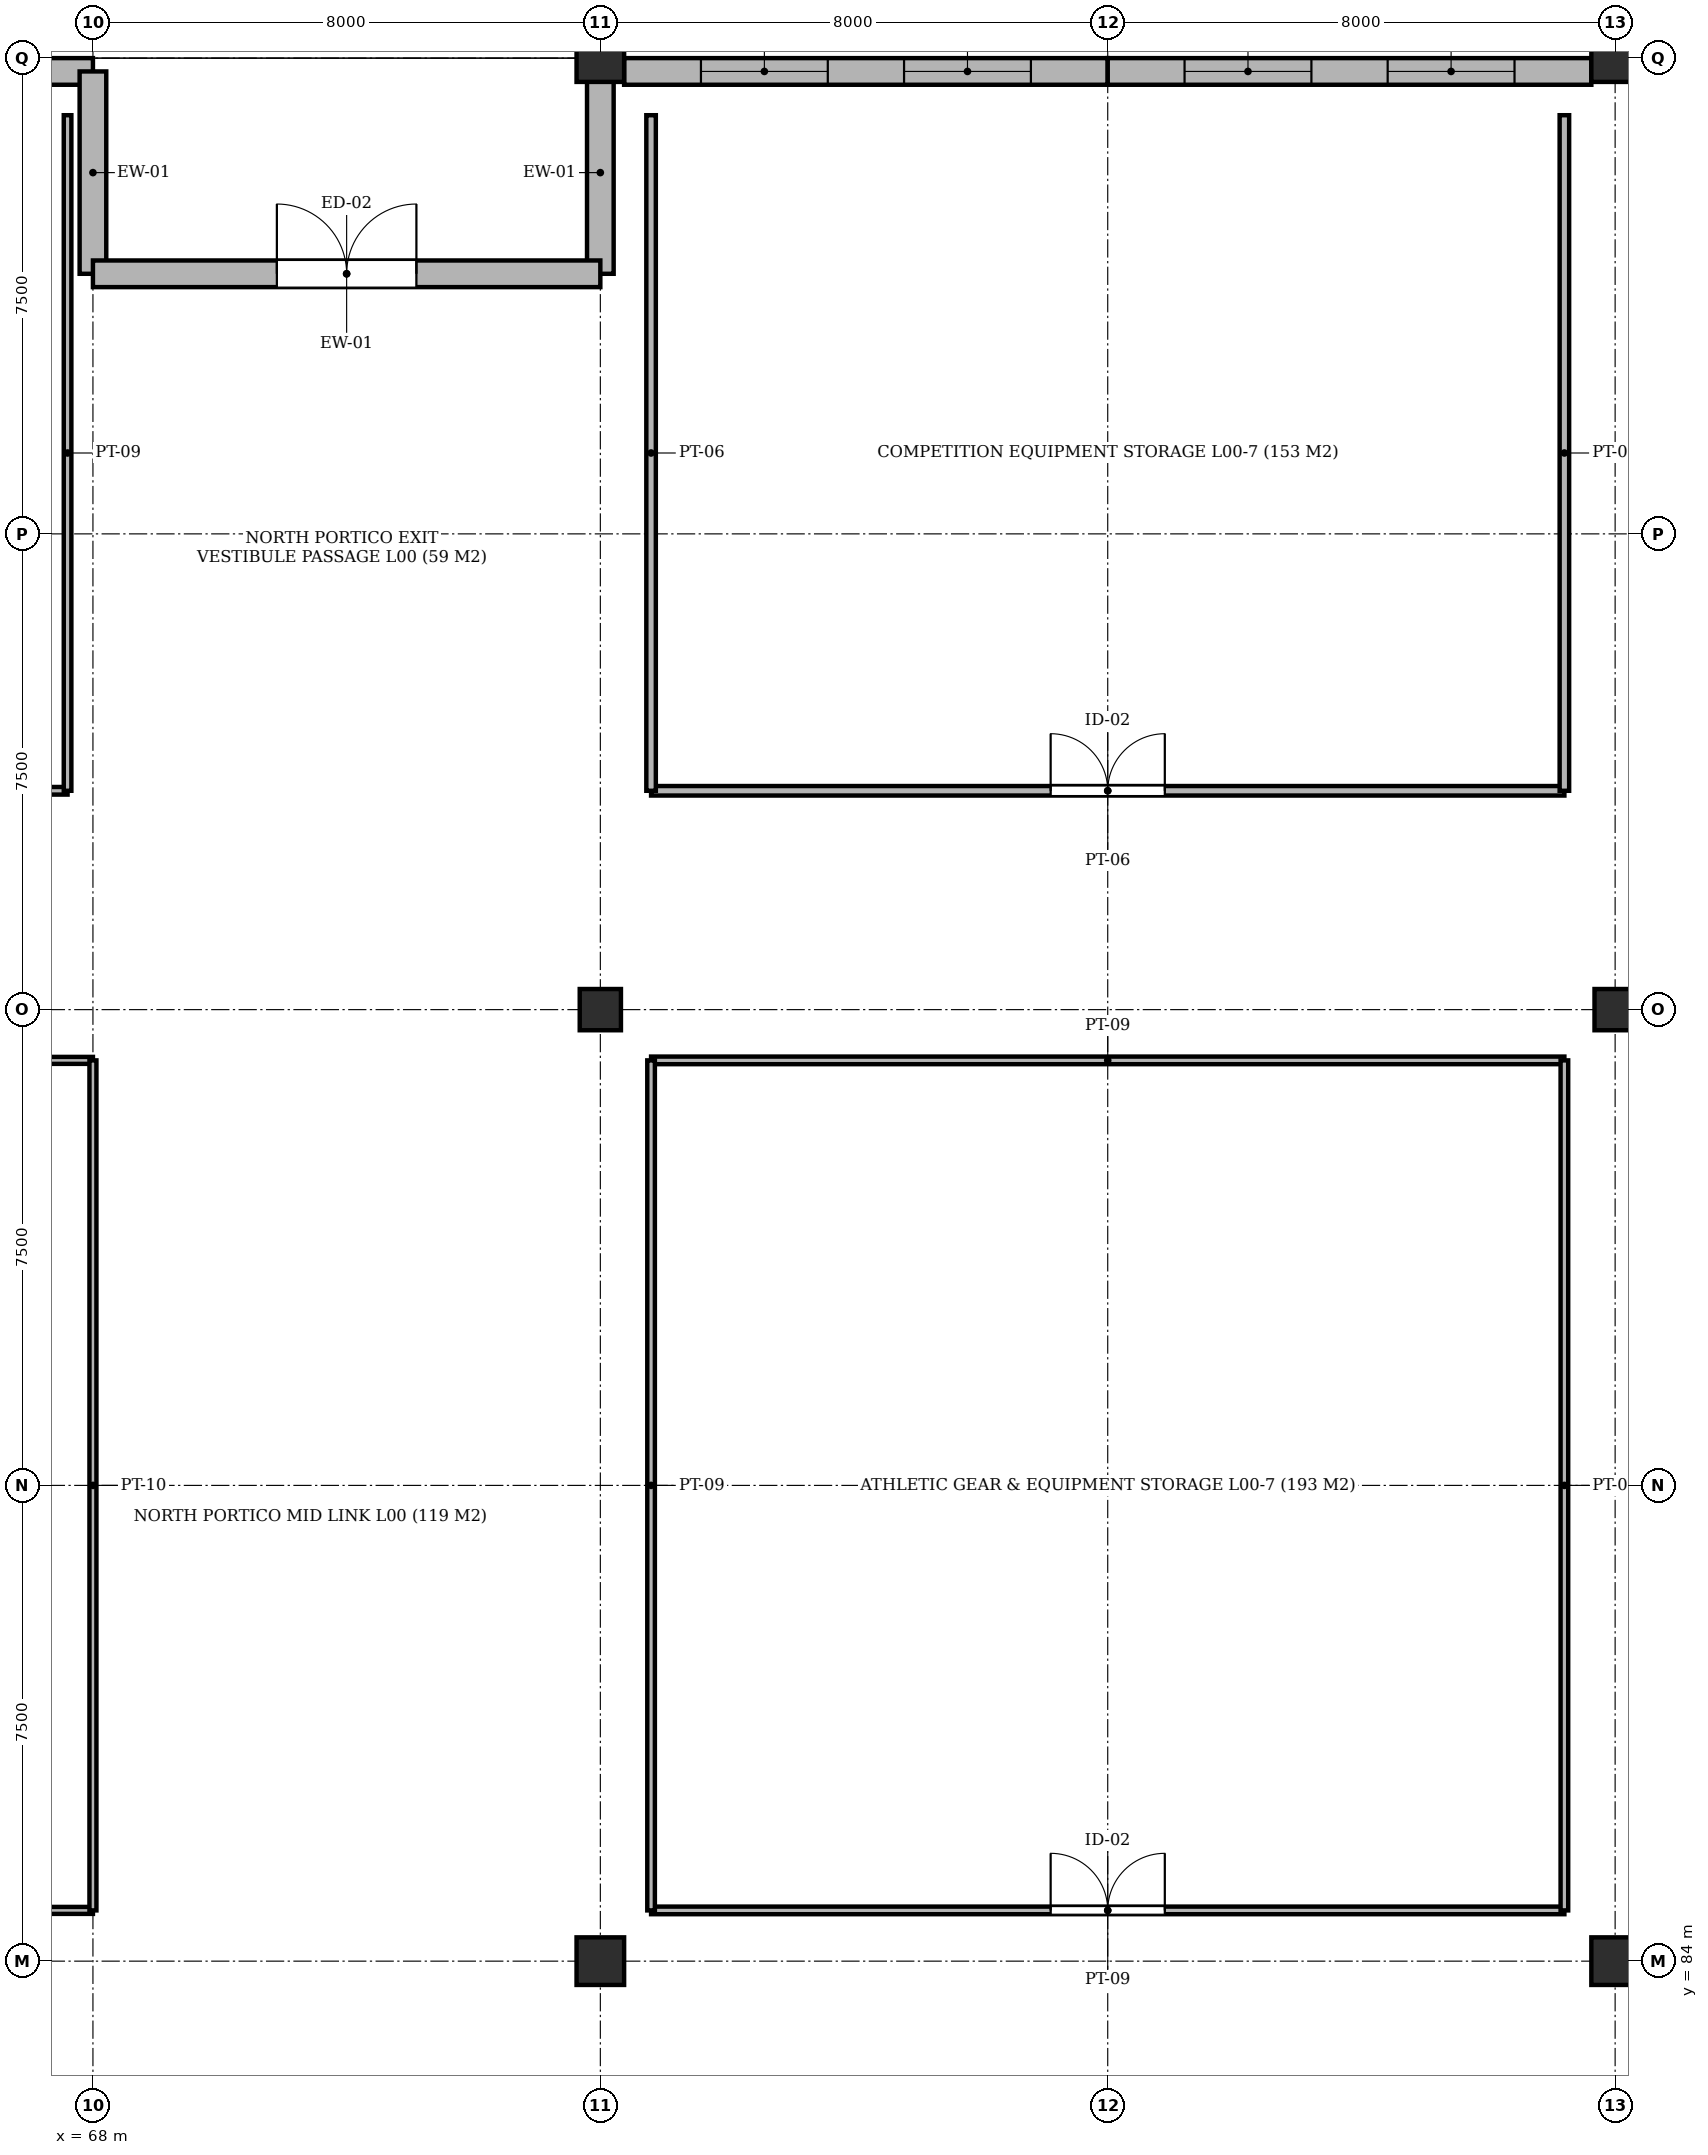
"""IFC4 building model, lengths in metres.
Left out: names, types, materials, properties, quantities, classifications, styles, units other than length and angle.
Written with IfcOpenShell. Run it as: python <this file> out.ifc"""

import sys

from ifc_helpers import new_model, si_unit, direction, frame, frame_2d, origin, origin_2d, place, context, subcontext, project, spatial, rectangle, extrude, element, fill, save


model = new_model("IFC4")
c1 = context("Model", 3, precision=1e-05, world=origin(), true_north=direction((0.0, 1.0)))
c2 = subcontext(c1, "Body", "Model", "MODEL_VIEW")
j1 = project(units=[si_unit("LENGTHUNIT", "METRE"), si_unit("PLANEANGLEUNIT", "RADIAN")], contexts=[c1])
p1 = place(None, origin())
s1 = spatial("IfcSite", under=j1, at=p1, CompositionType="ELEMENT")
p2 = place(p1, origin())
s2 = spatial("IfcBuilding", under=s1, at=p2, CompositionType="ELEMENT")
p3 = place(p2, origin())
s3 = spatial("IfcBuildingStorey", under=s2, at=p3, CompositionType="ELEMENT", Elevation=0.0)
p4 = place(p3, frame((76.0, 84.0, -0.35), z_axis=(0.0, 0.0, 1.0), x_axis=(1.0, 0.0, 0.0)))
e1 = element("IfcColumn", 1, at=p4, inside=s3, PredefinedType="COLUMN", context=c2, shape_type="SweptSolid", body=[
    extrude(rectangle(XDim=0.75, YDim=0.75, at=origin_2d()), origin(), (0.0, 0.0, 1.0), 4.65),
])
p5 = place(p3, frame((76.0, 99.0, -0.35), z_axis=(0.0, 0.0, 1.0), x_axis=(1.0, 0.0, 0.0)))
e2 = element("IfcColumn", 2, at=p5, inside=s3, PredefinedType="COLUMN", context=c2, shape_type="SweptSolid", body=[
    extrude(rectangle(XDim=0.65, YDim=0.65, at=origin_2d()), origin(), (0.0, 0.0, 1.0), 4.65),
])
for number, where, z_axis, x_axis in (
    (3, (76.0, 114.0, -0.35), (0.0, 0.0, 1.0), (1.0, 0.0, 0.0)),
    (4, (92.0, 84.0, -0.35), (0.0, 0.0, 1.0), (1.0, 0.0, 0.0)),
):
    element("IfcColumn", number, at=place(p3, frame(where, z_axis=z_axis, x_axis=x_axis)), inside=s3, PredefinedType="COLUMN", context=c2, shape_type="SweptSolid", body=[
        extrude(rectangle(XDim=0.75, YDim=0.75, at=origin_2d()), origin(), (0.0, 0.0, 1.0), 4.65),
    ])
p6 = place(p3, frame((92.0, 99.0, -0.35), z_axis=(0.0, 0.0, 1.0), x_axis=(1.0, 0.0, 0.0)))
e5 = element("IfcColumn", 5, at=p6, inside=s3, PredefinedType="COLUMN", context=c2, shape_type="SweptSolid", body=[
    extrude(rectangle(XDim=0.65, YDim=0.65, at=origin_2d()), origin(), (0.0, 0.0, 1.0), 4.65),
])
p7 = place(p3, frame((92.0, 114.0, -0.35), z_axis=(0.0, 0.0, 1.0), x_axis=(1.0, 0.0, 0.0)))
e6 = element("IfcColumn", 6, at=p7, inside=s3, PredefinedType="COLUMN", context=c2, shape_type="SweptSolid", body=[
    extrude(rectangle(XDim=0.75, YDim=0.75, at=origin_2d()), origin(), (0.0, 0.0, 1.0), 4.65),
])
p8 = place(p3, frame((68.0, 113.79, 0.0), z_axis=(0.0, 0.0, 1.0), x_axis=(-1.0, 0.0, 0.0)))
e7 = element("IfcWall", 7, at=p8, inside=s3, PredefinedType="SOLIDWALL", context=c2, shape_type="SweptSolid", body=[
    extrude(rectangle(XDim=7.625, YDim=0.42, at=frame_2d((3.812, 0.0))), origin(), (0.0, 0.0, 1.0), 3.45),
])
p9 = place(p8, frame((4.414, 0.0, 0.92)))
e8 = element("IfcOpeningElement", 8, at=p9, cuts=e7, PredefinedType="OPENING", context=c2, shape_type="SweptSolid", body=[
    extrude(rectangle(XDim=2.0, YDim=1.89, at=frame_2d((1.0, 0.945))), frame((0.0, 0.222, 0.0), z_axis=(0.0, -1.0, 0.0), x_axis=(1.0, 0.0, 0.0)), (0.0, 0.0, 1.0), 0.444),
])
p10 = place(p8, frame((1.211, 0.0, 0.92)))
e9 = element("IfcOpeningElement", 9, at=p10, cuts=e7, PredefinedType="OPENING", context=c2, shape_type="SweptSolid", body=[
    extrude(rectangle(XDim=2.0, YDim=1.89, at=frame_2d((1.0, 0.945))), frame((0.0, 0.222, 0.0), z_axis=(0.0, -1.0, 0.0), x_axis=(1.0, 0.0, 0.0)), (0.0, 0.0, 1.0), 0.444),
])
p11 = place(p3, frame((76.0, 113.79, 0.0), z_axis=(0.0, 0.0, 1.0), x_axis=(0.0, -1.0, 0.0)))
e10 = element("IfcWall", 10, at=p11, inside=s3, PredefinedType="SOLIDWALL", context=c2, shape_type="SweptSolid", body=[
    extrude(rectangle(XDim=3.19, YDim=0.42, at=frame_2d((1.595, 0.0))), origin(), (0.0, 0.0, 1.0), 3.15),
])
p12 = place(p3, frame((68.0, 110.6, 0.0), z_axis=(0.0, 0.0, 1.0), x_axis=(0.0, 1.0, 0.0)))
e11 = element("IfcWall", 11, at=p12, inside=s3, PredefinedType="SOLIDWALL", context=c2, shape_type="SweptSolid", body=[
    extrude(rectangle(XDim=3.19, YDim=0.42, at=frame_2d((1.595, 0.0))), origin(), (0.0, 0.0, 1.0), 3.82),
])
p13 = place(p3, frame((76.0, 110.6, 0.0), z_axis=(0.0, 0.0, 1.0), x_axis=(-1.0, 0.0, 0.0)))
e12 = element("IfcWall", 12, at=p13, inside=s3, PredefinedType="SOLIDWALL", context=c2, shape_type="SweptSolid", body=[
    extrude(rectangle(XDim=8.0, YDim=0.42, at=frame_2d((4.0, 0.0))), origin(), (0.0, 0.0, 1.0), 3.82),
])
p14 = place(p13, frame((2.9, 0.0, 0.0)))
e13 = element("IfcOpeningElement", 13, at=p14, cuts=e12, PredefinedType="OPENING", context=c2, shape_type="SweptSolid", body=[
    extrude(rectangle(XDim=2.2, YDim=2.65, at=frame_2d((1.1, 1.325))), frame((0.0, 0.222, 0.0), z_axis=(0.0, -1.0, 0.0), x_axis=(1.0, 0.0, 0.0)), (0.0, 0.0, 1.0), 0.444),
])
p15 = place(p3, frame((84.0, 113.79, 0.0), z_axis=(0.0, 0.0, 1.0), x_axis=(-1.0, 0.0, 0.0)))
e14 = element("IfcWall", 14, at=p15, inside=s3, PredefinedType="SOLIDWALL", context=c2, shape_type="SweptSolid", body=[
    extrude(rectangle(XDim=7.625, YDim=0.42, at=frame_2d((3.812, 0.0))), origin(), (0.0, 0.0, 1.0), 3.45),
])
p16 = place(p15, frame((4.414, 0.0, 0.92)))
e15 = element("IfcOpeningElement", 15, at=p16, cuts=e14, PredefinedType="OPENING", context=c2, shape_type="SweptSolid", body=[
    extrude(rectangle(XDim=2.0, YDim=1.89, at=frame_2d((1.0, 0.945))), frame((0.0, 0.222, 0.0), z_axis=(0.0, -1.0, 0.0), x_axis=(1.0, 0.0, 0.0)), (0.0, 0.0, 1.0), 0.444),
])
p17 = place(p15, frame((1.211, 0.0, 0.92)))
e16 = element("IfcOpeningElement", 16, at=p17, cuts=e14, PredefinedType="OPENING", context=c2, shape_type="SweptSolid", body=[
    extrude(rectangle(XDim=2.0, YDim=1.89, at=frame_2d((1.0, 0.945))), frame((0.0, 0.222, 0.0), z_axis=(0.0, -1.0, 0.0), x_axis=(1.0, 0.0, 0.0)), (0.0, 0.0, 1.0), 0.444),
])
p18 = place(p3, frame((91.625, 113.79, 0.0), z_axis=(0.0, 0.0, 1.0), x_axis=(-1.0, 0.0, 0.0)))
e17 = element("IfcWall", 17, at=p18, inside=s3, PredefinedType="SOLIDWALL", context=c2, shape_type="SweptSolid", body=[
    extrude(rectangle(XDim=7.625, YDim=0.42, at=frame_2d((3.812, 0.0))), origin(), (0.0, 0.0, 1.0), 3.45),
])
p19 = place(p18, frame((4.414, 0.0, 0.92)))
e18 = element("IfcOpeningElement", 18, at=p19, cuts=e17, PredefinedType="OPENING", context=c2, shape_type="SweptSolid", body=[
    extrude(rectangle(XDim=2.0, YDim=1.89, at=frame_2d((1.0, 0.945))), frame((0.0, 0.222, 0.0), z_axis=(0.0, -1.0, 0.0), x_axis=(1.0, 0.0, 0.0)), (0.0, 0.0, 1.0), 0.444),
])
p20 = place(p18, frame((1.211, 0.0, 0.92)))
e19 = element("IfcOpeningElement", 19, at=p20, cuts=e17, PredefinedType="OPENING", context=c2, shape_type="SweptSolid", body=[
    extrude(rectangle(XDim=2.0, YDim=1.89, at=frame_2d((1.0, 0.945))), frame((0.0, 0.222, 0.0), z_axis=(0.0, -1.0, 0.0), x_axis=(1.0, 0.0, 0.0)), (0.0, 0.0, 1.0), 0.444),
])
p21 = place(p3, frame((60.8, 84.8, 0.0), z_axis=(0.0, 0.0, 1.0), x_axis=(1.0, 0.0, 0.0)))
e20 = element("IfcWall", 20, at=p21, inside=s3, PredefinedType="PARTITIONING", context=c2, shape_type="SweptSolid", body=[
    extrude(rectangle(XDim=7.2, YDim=0.11, at=frame_2d((3.6, 0.0))), origin(), (0.0, 0.0, 1.0), 3.88),
])
p22 = place(p21, frame((3.075, 0.0, 0.0)))
e21 = element("IfcOpeningElement", 21, at=p22, cuts=e20, PredefinedType="OPENING", context=c2, shape_type="SweptSolid", body=[
    extrude(rectangle(XDim=1.05, YDim=2.15, at=frame_2d((0.525, 1.075))), frame((0.0, 0.067, 0.0), z_axis=(0.0, -1.0, 0.0), x_axis=(1.0, 0.0, 0.0)), (0.0, 0.0, 1.0), 0.134),
])
p23 = place(p3, frame((60.8, 98.2, 0.0), z_axis=(0.0, 0.0, 1.0), x_axis=(1.0, 0.0, 0.0)))
e22 = element("IfcWall", 22, at=p23, inside=s3, PredefinedType="PARTITIONING", context=c2, shape_type="SweptSolid", body=[
    extrude(rectangle(XDim=7.2, YDim=0.11, at=frame_2d((3.6, 0.0))), origin(), (0.0, 0.0, 1.0), 3.88),
])
p24 = place(p3, frame((68.0, 84.8, 0.0), z_axis=(0.0, 0.0, 1.0), x_axis=(0.0, 1.0, 0.0)))
e23 = element("IfcWall", 23, at=p24, inside=s3, PredefinedType="PARTITIONING", context=c2, shape_type="SweptSolid", body=[
    extrude(rectangle(XDim=13.4, YDim=0.11, at=frame_2d((6.7, 0.0))), origin(), (0.0, 0.0, 1.0), 3.88),
])
p25 = place(p3, frame((76.8, 84.8, 0.0), z_axis=(0.0, 0.0, 1.0), x_axis=(1.0, 0.0, 0.0)))
e24 = element("IfcWall", 24, at=p25, inside=s3, PredefinedType="PARTITIONING", context=c2, shape_type="SweptSolid", body=[
    extrude(rectangle(XDim=14.4, YDim=0.12, at=frame_2d((7.2, 0.0))), origin(), (0.0, 0.0, 1.0), 3.88),
])
p26 = place(p25, frame((6.3, 0.0, 0.0)))
e25 = element("IfcOpeningElement", 25, at=p26, cuts=e24, PredefinedType="OPENING", context=c2, shape_type="SweptSolid", body=[
    extrude(rectangle(XDim=1.8, YDim=2.25, at=frame_2d((0.9, 1.125))), frame((0.0, 0.072, 0.0), z_axis=(0.0, -1.0, 0.0), x_axis=(1.0, 0.0, 0.0)), (0.0, 0.0, 1.0), 0.144),
])
p27 = place(p3, frame((76.8, 98.2, 0.0), z_axis=(0.0, 0.0, 1.0), x_axis=(1.0, 0.0, 0.0)))
e26 = element("IfcWall", 26, at=p27, inside=s3, PredefinedType="PARTITIONING", context=c2, shape_type="SweptSolid", body=[
    extrude(rectangle(XDim=14.4, YDim=0.12, at=frame_2d((7.2, 0.0))), origin(), (0.0, 0.0, 1.0), 3.88),
])
for number, where, z_axis, x_axis in (
    (27, (76.8, 84.8, 0.0), (0.0, 0.0, 1.0), (0.0, 1.0, 0.0)),
    (28, (91.2, 84.8, 0.0), (0.0, 0.0, 1.0), (0.0, 1.0, 0.0)),
):
    element("IfcWall", number, at=place(p3, frame(where, z_axis=z_axis, x_axis=x_axis)), inside=s3, PredefinedType="PARTITIONING", context=c2, shape_type="SweptSolid", body=[
        extrude(rectangle(XDim=13.4, YDim=0.12, at=frame_2d((6.7, 0.0))), origin(), (0.0, 0.0, 1.0), 3.88),
    ])
p28 = place(p3, frame((60.8, 102.45, 0.0), z_axis=(0.0, 0.0, 1.0), x_axis=(1.0, 0.0, 0.0)))
e29 = element("IfcWall", 29, at=p28, inside=s3, PredefinedType="PARTITIONING", context=c2, shape_type="SweptSolid", body=[
    extrude(rectangle(XDim=6.8, YDim=0.12, at=frame_2d((3.4, 0.0))), origin(), (0.0, 0.0, 1.0), 3.88),
])
p29 = place(p28, frame((2.875, 0.0, 0.0)))
e30 = element("IfcOpeningElement", 30, at=p29, cuts=e29, PredefinedType="OPENING", context=c2, shape_type="SweptSolid", body=[
    extrude(rectangle(XDim=1.05, YDim=2.15, at=frame_2d((0.525, 1.075))), frame((0.0, 0.072, 0.0), z_axis=(0.0, -1.0, 0.0), x_axis=(1.0, 0.0, 0.0)), (0.0, 0.0, 1.0), 0.144),
])
p30 = place(p3, frame((67.6, 102.45, 0.0), z_axis=(0.0, 0.0, 1.0), x_axis=(0.0, 1.0, 0.0)))
e31 = element("IfcWall", 31, at=p30, inside=s3, PredefinedType="PARTITIONING", context=c2, shape_type="SweptSolid", body=[
    extrude(rectangle(XDim=10.65, YDim=0.12, at=frame_2d((5.325, 0.0))), origin(), (0.0, 0.0, 1.0), 3.88),
])
p31 = place(p3, frame((76.8, 102.45, 0.0), z_axis=(0.0, 0.0, 1.0), x_axis=(1.0, 0.0, 0.0)))
e32 = element("IfcWall", 32, at=p31, inside=s3, PredefinedType="PARTITIONING", context=c2, shape_type="SweptSolid", body=[
    extrude(rectangle(XDim=14.4, YDim=0.15, at=frame_2d((7.2, 0.0))), origin(), (0.0, 0.0, 1.0), 3.88),
])
p32 = place(p31, frame((6.3, 0.0, 0.0)))
e33 = element("IfcOpeningElement", 33, at=p32, cuts=e32, PredefinedType="OPENING", context=c2, shape_type="SweptSolid", body=[
    extrude(rectangle(XDim=1.8, YDim=2.25, at=frame_2d((0.9, 1.125))), frame((0.0, 0.087, 0.0), z_axis=(0.0, -1.0, 0.0), x_axis=(1.0, 0.0, 0.0)), (0.0, 0.0, 1.0), 0.174),
])
for number, where, z_axis, x_axis in (
    (34, (76.8, 102.45, 0.0), (0.0, 0.0, 1.0), (0.0, 1.0, 0.0)),
    (35, (91.2, 102.45, 0.0), (0.0, 0.0, 1.0), (0.0, 1.0, 0.0)),
):
    element("IfcWall", number, at=place(p3, frame(where, z_axis=z_axis, x_axis=x_axis)), inside=s3, PredefinedType="PARTITIONING", context=c2, shape_type="SweptSolid", body=[
        extrude(rectangle(XDim=10.65, YDim=0.15, at=frame_2d((5.325, 0.0))), origin(), (0.0, 0.0, 1.0), 3.88),
    ])
p33 = place(p14, frame((2.2, 0.0, 0.0), z_axis=(0.0, 0.0, 1.0), x_axis=(-1.0, 0.0, 0.0)))
e36 = element("IfcDoor", 36, at=p33, inside=s3, OperationType="DOUBLE_DOOR_SINGLE_SWING", PredefinedType="DOOR", context=c2, shape_type="SweptSolid", body=[
    extrude(rectangle(XDim=2.2, YDim=2.65, at=frame_2d((1.1, 1.325))), frame((0.0, 0.025, 0.0), z_axis=(0.0, -1.0, 0.0), x_axis=(1.0, 0.0, 0.0)), (0.0, 0.0, 1.0), 0.05),
])
fill(e13, e36)
p34 = place(p16, origin())
e37 = element("IfcWindow", 37, at=p34, inside=s3, PartitioningType="SINGLE_PANEL", PredefinedType="WINDOW", context=c2, shape_type="SweptSolid", body=[
    extrude(rectangle(XDim=2.0, YDim=1.89, at=frame_2d((1.0, 0.945))), frame((0.0, 0.03, 0.0), z_axis=(0.0, -1.0, 0.0), x_axis=(1.0, 0.0, 0.0)), (0.0, 0.0, 1.0), 0.06),
])
fill(e15, e37)
p35 = place(p17, origin())
e38 = element("IfcWindow", 38, at=p35, inside=s3, PartitioningType="SINGLE_PANEL", PredefinedType="WINDOW", context=c2, shape_type="SweptSolid", body=[
    extrude(rectangle(XDim=2.0, YDim=1.89, at=frame_2d((1.0, 0.945))), frame((0.0, 0.03, 0.0), z_axis=(0.0, -1.0, 0.0), x_axis=(1.0, 0.0, 0.0)), (0.0, 0.0, 1.0), 0.06),
])
fill(e16, e38)
p36 = place(p19, origin())
e39 = element("IfcWindow", 39, at=p36, inside=s3, PartitioningType="SINGLE_PANEL", PredefinedType="WINDOW", context=c2, shape_type="SweptSolid", body=[
    extrude(rectangle(XDim=2.0, YDim=1.89, at=frame_2d((1.0, 0.945))), frame((0.0, 0.03, 0.0), z_axis=(0.0, -1.0, 0.0), x_axis=(1.0, 0.0, 0.0)), (0.0, 0.0, 1.0), 0.06),
])
fill(e18, e39)
p37 = place(p20, origin())
e40 = element("IfcWindow", 40, at=p37, inside=s3, PartitioningType="SINGLE_PANEL", PredefinedType="WINDOW", context=c2, shape_type="SweptSolid", body=[
    extrude(rectangle(XDim=2.0, YDim=1.89, at=frame_2d((1.0, 0.945))), frame((0.0, 0.03, 0.0), z_axis=(0.0, -1.0, 0.0), x_axis=(1.0, 0.0, 0.0)), (0.0, 0.0, 1.0), 0.06),
])
fill(e19, e40)
p38 = place(p26, origin())
e41 = element("IfcDoor", 41, at=p38, inside=s3, OperationType="DOUBLE_DOOR_SINGLE_SWING", PredefinedType="DOOR", context=c2, shape_type="SweptSolid", body=[
    extrude(rectangle(XDim=1.8, YDim=2.25, at=frame_2d((0.9, 1.125))), frame((0.0, 0.025, 0.0), z_axis=(0.0, -1.0, 0.0), x_axis=(1.0, 0.0, 0.0)), (0.0, 0.0, 1.0), 0.05),
])
fill(e25, e41)
p39 = place(p32, origin())
e42 = element("IfcDoor", 42, at=p39, inside=s3, OperationType="DOUBLE_DOOR_SINGLE_SWING", PredefinedType="DOOR", context=c2, shape_type="SweptSolid", body=[
    extrude(rectangle(XDim=1.8, YDim=2.25, at=frame_2d((0.9, 1.125))), frame((0.0, 0.025, 0.0), z_axis=(0.0, -1.0, 0.0), x_axis=(1.0, 0.0, 0.0)), (0.0, 0.0, 1.0), 0.05),
])
fill(e33, e42)
save(model, sys.argv[1])
